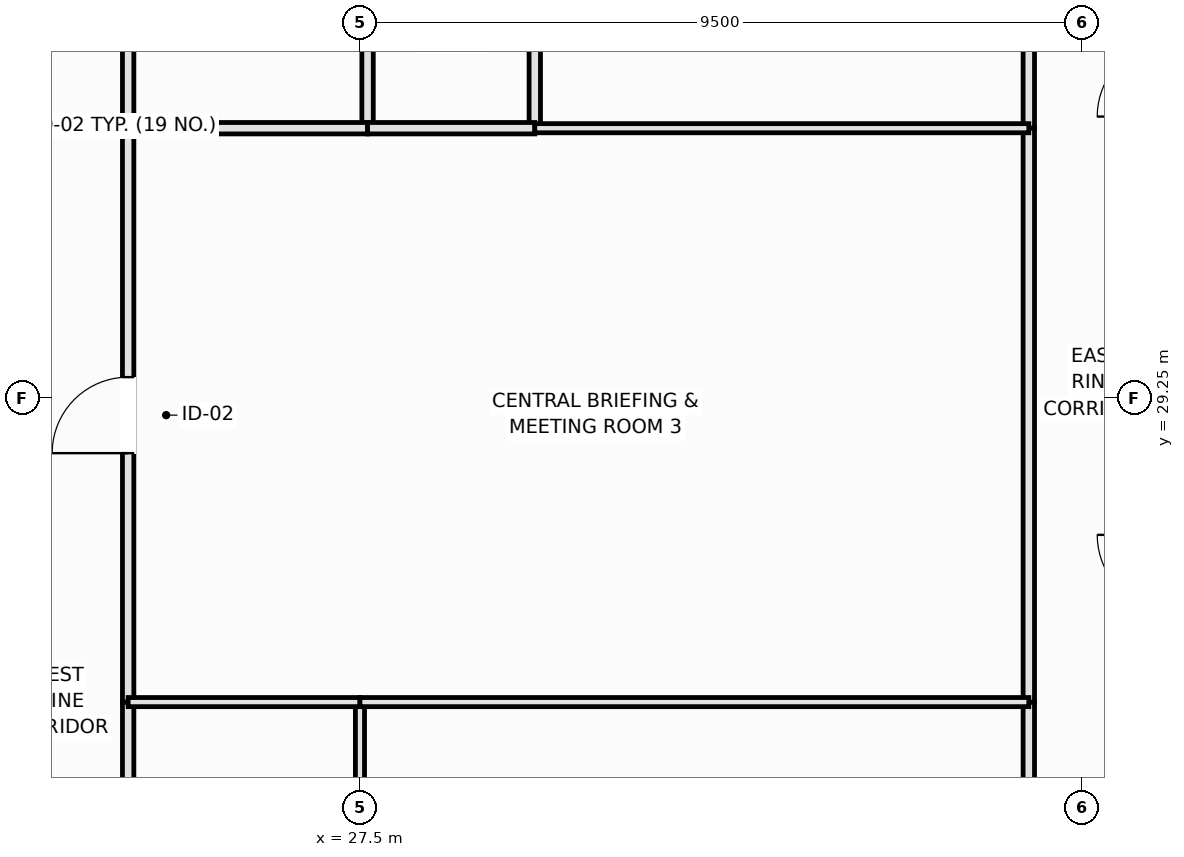
"""IFC4 building model, lengths in metres.
Left out: names, types, materials, properties, quantities, classifications, styles, units other than length and angle.
Written with IfcOpenShell. Run it as: python <this file> out.ifc"""

import sys

from ifc_helpers import new_model, si_unit, direction, frame, frame_2d, origin, place, context, subcontext, project, spatial, rectangle, extrude, element, fill, save


model = new_model("IFC4")
c1 = context("Model", 3, precision=1e-05, world=origin(), true_north=direction((0.0, 1.0)))
c2 = subcontext(c1, "Body", "Model", "MODEL_VIEW")
j1 = project(units=[si_unit("LENGTHUNIT", "METRE"), si_unit("PLANEANGLEUNIT", "RADIAN")], contexts=[c1])
p1 = place(None, origin())
s1 = spatial("IfcSite", under=j1, at=p1, CompositionType="ELEMENT")
p2 = place(p1, origin())
s2 = spatial("IfcBuilding", under=s1, at=p2, CompositionType="ELEMENT")
p3 = place(p2, frame((0.0, 0.0, 57.55)))
s3 = spatial("IfcBuildingStorey", under=s2, at=p3, CompositionType="ELEMENT", Elevation=57.55)
p4 = place(p3, frame((24.45, 32.8, 0.0), z_axis=(0.0, 0.0, 1.0), x_axis=(0.0, 1.0, 0.0)))
e1 = element("IfcWall", 1, at=p4, inside=s3, PredefinedType="PLUMBINGWALL", context=c2, shape_type="SweptSolid", body=[
    extrude(rectangle(XDim=3.1, YDim=0.15, at=frame_2d((1.55, 0.0))), origin(), (0.0, 0.0, 1.0), 3.37),
])
p5 = place(p4, frame((1.1, 0.0, 0.0)))
e2 = element("IfcOpeningElement", 2, at=p5, cuts=e1, PredefinedType="OPENING", context=c2, shape_type="SweptSolid", body=[
    extrude(rectangle(XDim=0.9, YDim=2.1, at=frame_2d((0.45, 1.05))), frame((0.0, 0.085, 0.0), z_axis=(0.0, -1.0, 0.0), x_axis=(1.0, 0.0, 0.0)), (0.0, 0.0, 1.0), 0.17),
])
p6 = place(p3, frame((24.45, 19.6, 0.0), z_axis=(0.0, 0.0, 1.0), x_axis=(0.0, 1.0, 0.0)))
e3 = element("IfcWall", 3, at=p6, inside=s3, PredefinedType="PARTITIONING", context=c2, shape_type="SweptSolid", body=[
    extrude(rectangle(XDim=5.65, YDim=0.15, at=frame_2d((2.825, 0.0))), origin(), (0.0, 0.0, 1.0), 3.37),
])
p7 = place(p6, frame((2.325, 0.0, 0.0)))
e4 = element("IfcOpeningElement", 4, at=p7, cuts=e3, PredefinedType="OPENING", context=c2, shape_type="SweptSolid", body=[
    extrude(rectangle(XDim=1.0, YDim=2.15, at=frame_2d((0.5, 1.075))), frame((0.0, 0.085, 0.0), z_axis=(0.0, -1.0, 0.0), x_axis=(1.0, 0.0, 0.0)), (0.0, 0.0, 1.0), 0.17),
])
p8 = place(p3, frame((24.45, 25.25, 0.0), z_axis=(0.0, 0.0, 1.0), x_axis=(0.0, 1.0, 0.0)))
e5 = element("IfcWall", 5, at=p8, inside=s3, PredefinedType="PARTITIONING", context=c2, shape_type="SweptSolid", body=[
    extrude(rectangle(XDim=7.55, YDim=0.15, at=frame_2d((3.775, 0.0))), origin(), (0.0, 0.0, 1.0), 3.37),
])
p9 = place(p8, frame((3.275, 0.0, 0.0)))
e6 = element("IfcOpeningElement", 6, at=p9, cuts=e5, PredefinedType="OPENING", context=c2, shape_type="SweptSolid", body=[
    extrude(rectangle(XDim=1.0, YDim=2.15, at=frame_2d((0.5, 1.075))), frame((0.0, 0.085, 0.0), z_axis=(0.0, -1.0, 0.0), x_axis=(1.0, 0.0, 0.0)), (0.0, 0.0, 1.0), 0.17),
])
p10 = place(p3, frame((36.3, 32.8, 0.0), z_axis=(0.0, 0.0, 1.0), x_axis=(0.0, 1.0, 0.0)))
e7 = element("IfcWall", 7, at=p10, inside=s3, PredefinedType="PARTITIONING", context=c2, shape_type="SweptSolid", body=[
    extrude(rectangle(XDim=3.1, YDim=0.15, at=frame_2d((1.55, 0.0))), origin(), (0.0, 0.0, 1.0), 3.37),
])
p11 = place(p10, frame((1.05, 0.0, 0.0)))
e8 = element("IfcOpeningElement", 8, at=p11, cuts=e7, PredefinedType="OPENING", context=c2, shape_type="SweptSolid", body=[
    extrude(rectangle(XDim=1.0, YDim=2.15, at=frame_2d((0.5, 1.075))), frame((0.0, 0.085, 0.0), z_axis=(0.0, -1.0, 0.0), x_axis=(1.0, 0.0, 0.0)), (0.0, 0.0, 1.0), 0.17),
])
p12 = place(p3, frame((36.3, 19.6, 0.0), z_axis=(0.0, 0.0, 1.0), x_axis=(0.0, 1.0, 0.0)))
e9 = element("IfcWall", 9, at=p12, inside=s3, PredefinedType="PARTITIONING", context=c2, shape_type="SweptSolid", body=[
    extrude(rectangle(XDim=5.65, YDim=0.15, at=frame_2d((2.825, 0.0))), origin(), (0.0, 0.0, 1.0), 3.37),
])
p13 = place(p12, frame((2.325, 0.0, 0.0)))
e10 = element("IfcOpeningElement", 10, at=p13, cuts=e9, PredefinedType="OPENING", context=c2, shape_type="SweptSolid", body=[
    extrude(rectangle(XDim=1.0, YDim=2.15, at=frame_2d((0.5, 1.075))), frame((0.0, 0.085, 0.0), z_axis=(0.0, -1.0, 0.0), x_axis=(1.0, 0.0, 0.0)), (0.0, 0.0, 1.0), 0.17),
])
p14 = place(p3, frame((36.3, 25.25, 0.0), z_axis=(0.0, 0.0, 1.0), x_axis=(0.0, 1.0, 0.0)))
e11 = element("IfcWall", 11, at=p14, inside=s3, PredefinedType="PARTITIONING", context=c2, shape_type="SweptSolid", body=[
    extrude(rectangle(XDim=7.55, YDim=0.15, at=frame_2d((3.775, 0.0))), origin(), (0.0, 0.0, 1.0), 3.37),
])
p15 = place(p3, frame((27.6, 32.8, 0.0), z_axis=(0.0, 0.0, 1.0), x_axis=(0.0, 1.0, 0.0)))
e12 = element("IfcWall", 12, at=p15, inside=s3, PredefinedType="PLUMBINGWALL", context=c2, shape_type="SweptSolid", body=[
    extrude(rectangle(XDim=3.1, YDim=0.15, at=frame_2d((1.55, 0.0))), origin(), (0.0, 0.0, 1.0), 3.37),
])
p16 = place(p3, frame((24.45, 32.8, 0.0), z_axis=(0.0, 0.0, 1.0), x_axis=(1.0, 0.0, 0.0)))
e13 = element("IfcWall", 13, at=p16, inside=s3, PredefinedType="PLUMBINGWALL", context=c2, shape_type="SweptSolid", body=[
    extrude(rectangle(XDim=3.15, YDim=0.15, at=frame_2d((1.575, 0.0))), origin(), (0.0, 0.0, 1.0), 3.37),
])
p17 = place(p3, frame((29.8, 32.8, 0.0), z_axis=(0.0, 0.0, 1.0), x_axis=(0.0, 1.0, 0.0)))
e14 = element("IfcWall", 14, at=p17, inside=s3, PredefinedType="PLUMBINGWALL", context=c2, shape_type="SweptSolid", body=[
    extrude(rectangle(XDim=3.1, YDim=0.15, at=frame_2d((1.55, 0.0))), origin(), (0.0, 0.0, 1.0), 3.37),
])
p18 = place(p3, frame((27.6, 32.8, 0.0), z_axis=(0.0, 0.0, 1.0), x_axis=(1.0, 0.0, 0.0)))
e15 = element("IfcWall", 15, at=p18, inside=s3, PredefinedType="PLUMBINGWALL", context=c2, shape_type="SweptSolid", body=[
    extrude(rectangle(XDim=2.2, YDim=0.15, at=frame_2d((1.1, 0.0))), origin(), (0.0, 0.0, 1.0), 3.37),
])
p19 = place(p3, frame((29.8, 32.8, 0.0), z_axis=(0.0, 0.0, 1.0), x_axis=(1.0, 0.0, 0.0)))
e16 = element("IfcWall", 16, at=p19, inside=s3, PredefinedType="PARTITIONING", context=c2, shape_type="SweptSolid", body=[
    extrude(rectangle(XDim=6.5, YDim=0.12, at=frame_2d((3.25, 0.0))), origin(), (0.0, 0.0, 1.0), 3.37),
])
p20 = place(p3, frame((27.5, 19.6, 0.0), z_axis=(0.0, 0.0, 1.0), x_axis=(0.0, 1.0, 0.0)))
e17 = element("IfcWall", 17, at=p20, inside=s3, PredefinedType="PARTITIONING", context=c2, shape_type="SweptSolid", body=[
    extrude(rectangle(XDim=5.65, YDim=0.12, at=frame_2d((2.825, 0.0))), origin(), (0.0, 0.0, 1.0), 3.37),
])
p21 = place(p3, frame((24.45, 25.25, 0.0), z_axis=(0.0, 0.0, 1.0), x_axis=(1.0, 0.0, 0.0)))
e18 = element("IfcWall", 18, at=p21, inside=s3, PredefinedType="PARTITIONING", context=c2, shape_type="SweptSolid", body=[
    extrude(rectangle(XDim=3.05, YDim=0.12, at=frame_2d((1.525, 0.0))), origin(), (0.0, 0.0, 1.0), 2.72),
])
p22 = place(p3, frame((27.5, 25.25, 0.0), z_axis=(0.0, 0.0, 1.0), x_axis=(1.0, 0.0, 0.0)))
e19 = element("IfcWall", 19, at=p22, inside=s3, PredefinedType="PARTITIONING", context=c2, shape_type="SweptSolid", body=[
    extrude(rectangle(XDim=8.8, YDim=0.12, at=frame_2d((4.4, 0.0))), origin(), (0.0, 0.0, 1.0), 2.72),
])
p23 = place(p9, origin())
e20 = element("IfcDoor", 20, at=p23, inside=s3, OperationType="SINGLE_SWING_LEFT", PredefinedType="DOOR", context=c2, shape_type="SweptSolid", body=[
    extrude(rectangle(XDim=1.0, YDim=2.15, at=frame_2d((0.5, 1.075))), frame((0.0, 0.025, 0.0), z_axis=(0.0, -1.0, 0.0), x_axis=(1.0, 0.0, 0.0)), (0.0, 0.0, 1.0), 0.05),
])
fill(e6, e20)
save(model, sys.argv[1])
